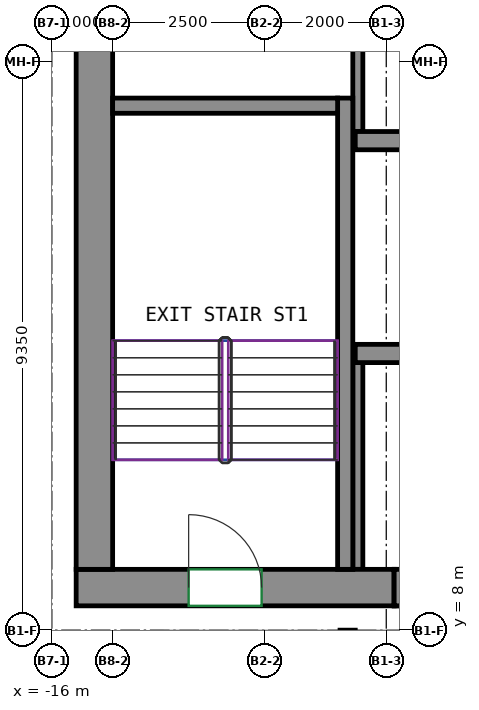
"""IFC4 building model, lengths in metres.
Left out: names, types, materials, properties, quantities, classifications, styles, units other than length and angle.
Written with IfcOpenShell. Run it as: python <this file> out.ifc"""

import sys

from ifc_helpers import new_model, si_unit, direction, frame, frame_2d, origin, place, context, subcontext, project, spatial, rectangle, extrude, source, transform, mapped, element, fill, save


model = new_model("IFC4")
c1 = context("Model", 3, precision=1e-05, world=origin(), true_north=direction((0.0, 1.0)))
c2 = subcontext(c1, "Body", "Model", "MODEL_VIEW")
j1 = project(units=[si_unit("LENGTHUNIT", "METRE"), si_unit("PLANEANGLEUNIT", "RADIAN")], contexts=[c1])
p1 = place(None, origin())
s1 = spatial("IfcSite", under=j1, at=p1, CompositionType="ELEMENT")
p2 = place(p1, origin())
s2 = spatial("IfcBuilding", under=s1, at=p2, CompositionType="ELEMENT")
p3 = place(p2, frame((0.0, 0.0, 323.8)))
s3 = spatial("IfcBuildingStorey", under=s2, at=p3, CompositionType="ELEMENT", Elevation=323.8)
m1 = source(origin(), c2, "Body", "SweptSolid", [
    extrude(rectangle(XDim=5.23, YDim=0.6, at=frame_2d((2.615, 0.0))), origin(), (0.0, 0.0, 1.0), 5.0),
])
p4 = place(p3, frame((-15.6, 8.7, -0.4), z_axis=(0.0, 0.0, 1.0), x_axis=(1.0, 0.0, 0.0)))
e1 = element("IfcWall", 1, at=p4, inside=s3, PredefinedType="SHEAR", context=c2, shape_type="MappedRepresentation", body=[
    mapped(m1, transform((0.0, 0.0, 0.0))),
])
p5 = place(p4, frame((1.85, 0.0, 0.4)))
e2 = element("IfcOpeningElement", 2, at=p5, cuts=e1, PredefinedType="OPENING", context=c2, shape_type="SweptSolid", body=[
    extrude(rectangle(XDim=1.2, YDim=2.1, at=frame_2d((0.6, 1.05))), frame((0.0, 0.31, 0.0), z_axis=(0.0, -1.0, 0.0), x_axis=(1.0, 0.0, 0.0)), (0.0, 0.0, 1.0), 0.62),
])
m2 = source(origin(), c2, "Body", "SweptSolid", [
    extrude(rectangle(XDim=12.0, YDim=0.6, at=frame_2d((6.0, 0.0))), origin(), (0.0, 0.0, 1.0), 5.0),
])
p6 = place(p3, frame((-15.3, 9.0, -0.4), z_axis=(0.0, 0.0, 1.0), x_axis=(0.0, 1.0, 0.0)))
e3 = element("IfcWall", 3, at=p6, inside=s3, PredefinedType="SHEAR", context=c2, shape_type="MappedRepresentation", body=[
    mapped(m2, transform((0.0, 0.0, 0.0))),
])
m3 = source(origin(), c2, "Body", "SweptSolid", [
    extrude(rectangle(XDim=7.75, YDim=0.25, at=frame_2d((3.875, 0.0))), origin(), (0.0, 0.0, 1.0), 5.0),
])
p7 = place(p3, frame((-11.175, 9.0, -0.4), z_axis=(0.0, 0.0, 1.0), x_axis=(0.0, 1.0, 0.0)))
e4 = element("IfcWall", 4, at=p7, inside=s3, PredefinedType="SHEAR", context=c2, shape_type="MappedRepresentation", body=[
    mapped(m3, transform((0.0, 0.0, 0.0))),
])
m4 = source(origin(), c2, "Body", "SweptSolid", [
    extrude(rectangle(XDim=3.7, YDim=0.25, at=frame_2d((1.85, 0.0))), origin(), (0.0, 0.0, 1.0), 5.0),
])
p8 = place(p3, frame((-15.0, 16.625, -0.4), z_axis=(0.0, 0.0, 1.0), x_axis=(1.0, 0.0, 0.0)))
e5 = element("IfcWall", 5, at=p8, inside=s3, PredefinedType="SHEAR", context=c2, shape_type="MappedRepresentation", body=[
    mapped(m4, transform((0.0, 0.0, 0.0))),
])
m5 = source(origin(), c2, "Body", "SweptSolid", [
    extrude(rectangle(XDim=2.916, YDim=0.3, at=frame_2d((1.458, 0.0))), origin(), (0.0, 0.0, 1.0), 5.0),
])
p9 = place(p3, frame((-11.01, 12.55, -0.4), z_axis=(0.0, 0.0, 1.0), x_axis=(1.0, 0.0, 0.0)))
e6 = element("IfcWall", 6, at=p9, inside=s3, PredefinedType="SHEAR", context=c2, shape_type="MappedRepresentation", body=[
    mapped(m5, transform((0.0, 0.0, 0.0))),
])
m6 = source(origin(), c2, "Body", "SweptSolid", [
    extrude(rectangle(XDim=2.591, YDim=0.3, at=frame_2d((1.296, 0.0))), origin(), (0.0, 0.0, 1.0), 5.0),
])
p10 = place(p3, frame((-11.01, 16.05, -0.4), z_axis=(0.0, 0.0, 1.0), x_axis=(1.0, 0.0, 0.0)))
e7 = element("IfcWall", 7, at=p10, inside=s3, PredefinedType="SHEAR", context=c2, shape_type="MappedRepresentation", body=[
    mapped(m6, transform((0.0, 0.0, 0.0))),
])
m7 = source(origin(), c2, "Body", "SweptSolid", [
    extrude(rectangle(XDim=1.4, YDim=0.6, at=frame_2d((0.7, 0.0))), origin(), (0.0, 0.0, 1.0), 0.7),
])
p11 = place(p3, frame((-10.37, 8.7, 3.9), z_axis=(0.0, 0.0, 1.0), x_axis=(1.0, 0.0, 0.0)))
e8 = element("IfcWall", 8, at=p11, inside=s3, PredefinedType="SHEAR", context=c2, shape_type="MappedRepresentation", body=[
    mapped(m7, transform((0.0, 0.0, 0.0))),
])
m8 = source(origin(), c2, "Body", "SweptSolid", [
    extrude(rectangle(XDim=4.8, YDim=0.165, at=frame_2d((2.4, 0.0))), origin(), (0.0, 0.0, 1.0), 4.6),
])
p12 = place(p3, frame((-10.968, 16.2, 0.0), z_axis=(0.0, 0.0, 1.0), x_axis=(0.0, 1.0, 0.0)))
e9 = element("IfcWall", 9, at=p12, inside=s3, PredefinedType="PARTITIONING", context=c2, shape_type="MappedRepresentation", body=[
    mapped(m8, transform((0.0, 0.0, 0.0))),
])
m9 = source(origin(), c2, "Body", "SweptSolid", [
    extrude(rectangle(XDim=3.4, YDim=0.165, at=frame_2d((1.7, 0.0))), origin(), (0.0, 0.0, 1.0), 4.6),
])
p13 = place(p3, frame((-10.968, 9.0, 0.0), z_axis=(0.0, 0.0, 1.0), x_axis=(0.0, 1.0, 0.0)))
e10 = element("IfcWall", 10, at=p13, inside=s3, PredefinedType="PARTITIONING", context=c2, shape_type="MappedRepresentation", body=[
    mapped(m9, transform((0.0, 0.0, 0.0))),
])
m10 = source(origin(), c2, "Body", "SweptSolid", [
    extrude(rectangle(XDim=1.4, YDim=0.6, at=frame_2d((0.7, 0.0))), origin(), (0.0, 0.0, 1.0), 2.7),
])
p14 = place(p3, frame((-10.37, 8.7, 0.0), z_axis=(0.0, 0.0, 1.0), x_axis=(1.0, 0.0, 0.0)))
e11 = element("IfcWall", 11, at=p14, inside=s3, PredefinedType="PARTITIONING", context=c2, shape_type="MappedRepresentation", body=[
    mapped(m10, transform((0.0, 0.0, 0.0))),
])
p15 = place(p14, frame((0.25, 0.0, 0.0)))
e12 = element("IfcOpeningElement", 12, at=p15, cuts=e11, PredefinedType="OPENING", context=c2, shape_type="SweptSolid", body=[
    extrude(rectangle(XDim=0.9, YDim=2.1, at=frame_2d((0.45, 1.05))), frame((0.0, 0.31, 0.0), z_axis=(0.0, -1.0, 0.0), x_axis=(1.0, 0.0, 0.0)), (0.0, 0.0, 1.0), 0.62),
])
p16 = place(p5, origin())
e13 = element("IfcDoor", 13, at=p16, inside=s3, OperationType="DOUBLE_DOOR_SINGLE_SWING", PredefinedType="DOOR", context=c2, shape_type="SweptSolid", body=[
    extrude(rectangle(XDim=1.2, YDim=2.1, at=frame_2d((0.6, 1.05))), frame((0.0, 0.205, 0.0), z_axis=(0.0, -1.0, 0.0), x_axis=(1.0, 0.0, 0.0)), (0.0, 0.0, 1.0), 0.05),
])
fill(e2, e13)
save(model, sys.argv[1])
